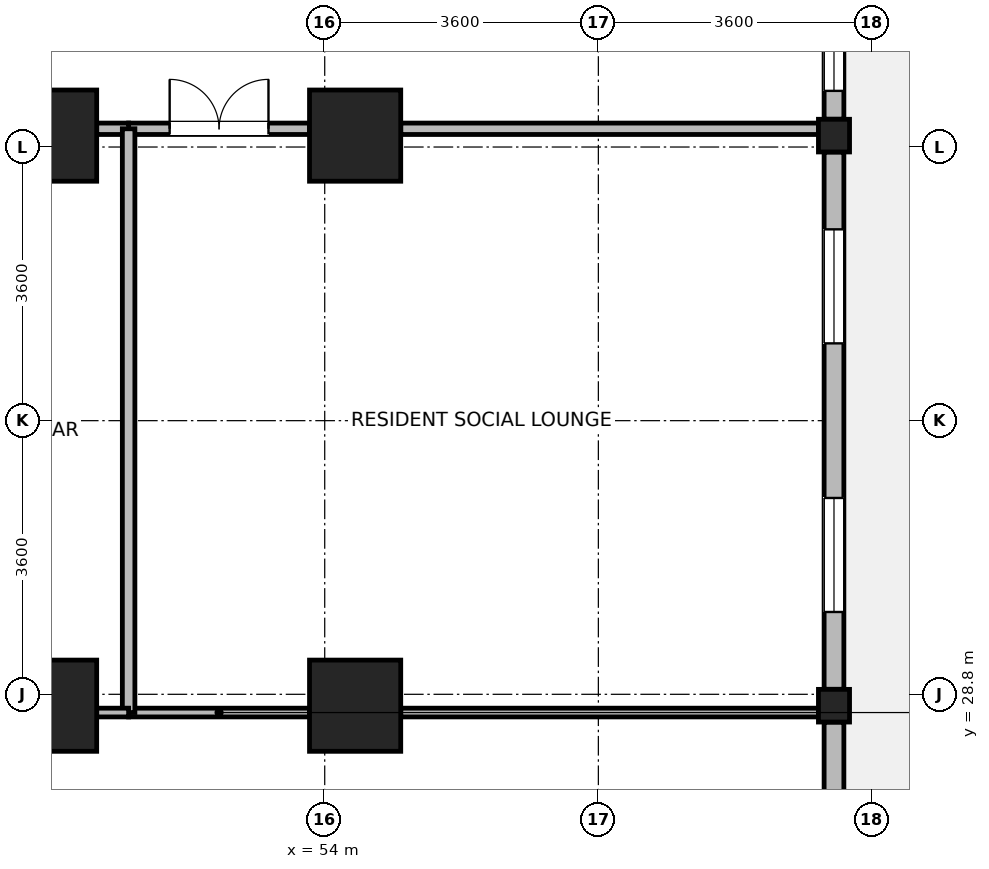
"""IFC4 building model, lengths in metres.
Left out: names, types, materials, properties, quantities, classifications, styles, units other than length and angle.
Written with IfcOpenShell. Run it as: python <this file> out.ifc"""

import sys

from ifc_helpers import new_model, si_unit, direction, frame, frame_2d, origin, origin_2d, place, context, subcontext, project, spatial, rectangle, i_section, extrude, source, transform, mapped, element, fill, save


model = new_model("IFC4")
c1 = context("Model", 3, precision=1e-05, world=origin(), true_north=direction((0.0, 1.0)))
c2 = subcontext(c1, "Body", "Model", "MODEL_VIEW")
j1 = project(units=[si_unit("LENGTHUNIT", "METRE"), si_unit("PLANEANGLEUNIT", "RADIAN")], contexts=[c1])
p1 = place(None, origin())
s1 = spatial("IfcSite", under=j1, at=p1, CompositionType="ELEMENT")
p2 = place(p1, origin())
s2 = spatial("IfcBuilding", under=s1, at=p2, CompositionType="ELEMENT")
p3 = place(p2, frame((0.0, 0.0, 111.9)))
s3 = spatial("IfcBuildingStorey", under=s2, at=p3, CompositionType="ELEMENT", Elevation=111.9)
m1 = source(origin(), c2, "Body", "SweptSolid", [
    extrude(rectangle(XDim=1.2, YDim=1.2, at=origin_2d()), origin(), (0.0, 0.0, 1.0), 3.7),
])
for number, where, z_axis, x_axis in (
    (1, (50.4, 28.65, 0.0), (0.0, 0.0, 1.0), (1.0, 0.0, 0.0)),
    (2, (50.4, 36.15, 0.0), (0.0, 0.0, 1.0), (1.0, 0.0, 0.0)),
    (3, (54.4, 28.65, 0.0), (0.0, 0.0, 1.0), (1.0, 0.0, 0.0)),
    (4, (54.4, 36.15, 0.0), (0.0, 0.0, 1.0), (1.0, 0.0, 0.0)),
):
    element("IfcColumn", number, at=place(p3, frame(where, z_axis=z_axis, x_axis=x_axis)), inside=s3, PredefinedType="COLUMN", context=c2, shape_type="MappedRepresentation", body=[
        mapped(m1, transform((0.0, 0.0, 0.0), x_axis=(1.0, 0.0, 0.0), y_axis=(0.0, 1.0, 0.0), z_axis=(0.0, 0.0, 1.0), scale=1.0)),
    ])
m2 = source(origin(), c2, "Body", "SweptSolid", [
    extrude(i_section(OverallWidth=0.409, OverallDepth=0.43, WebThickness=0.024, FlangeThickness=0.033, FilletRadius=0.015, at=origin_2d()), origin(), (0.0, 0.0, 1.0), 3.7),
])
for number, where, z_axis, x_axis in (
    (5, (60.7, 28.65, 0.0), (0.0, 0.0, 1.0), (1.0, 0.0, 0.0)),
    (6, (60.7, 36.15, 0.0), (0.0, 0.0, 1.0), (1.0, 0.0, 0.0)),
):
    element("IfcColumn", number, at=place(p3, frame(where, z_axis=z_axis, x_axis=x_axis)), inside=s3, PredefinedType="COLUMN", context=c2, shape_type="MappedRepresentation", body=[
        mapped(m2, transform((0.0, 0.0, 0.0), x_axis=(1.0, 0.0, 0.0), y_axis=(0.0, 1.0, 0.0), z_axis=(0.0, 0.0, 1.0), scale=1.0)),
    ])
p4 = place(p3, frame((60.7, 28.434, 0.0), z_axis=(0.0, 0.0, 1.0), x_axis=(0.0, -1.0, 0.0)))
e7 = element("IfcWall", 7, at=p4, inside=s3, PredefinedType="STANDARD", context=c2, shape_type="SweptSolid", body=[
    extrude(rectangle(XDim=6.618, YDim=0.26, at=frame_2d((3.309, 0.0))), origin(), (0.0, 0.0, 1.0), 2.98),
])
p5 = place(p4, frame((4.213, 0.0, 0.85)))
e8 = element("IfcOpeningElement", 8, at=p5, cuts=e7, PredefinedType="OPENING", context=c2, shape_type="SweptSolid", body=[
    extrude(rectangle(XDim=1.5, YDim=1.85, at=frame_2d((0.75, 0.925))), frame((0.0, 0.14, 0.0), z_axis=(0.0, -1.0, 0.0), x_axis=(1.0, 0.0, 0.0)), (0.0, 0.0, 1.0), 0.28),
])
p6 = place(p4, frame((2.834, 0.0, 0.85)))
e9 = element("IfcOpeningElement", 9, at=p6, cuts=e7, PredefinedType="OPENING", context=c2, shape_type="SweptSolid", body=[
    extrude(rectangle(XDim=0.95, YDim=1.75, at=frame_2d((0.475, 0.875))), frame((0.0, 0.14, 0.0), z_axis=(0.0, -1.0, 0.0), x_axis=(1.0, 0.0, 0.0)), (0.0, 0.0, 1.0), 0.28),
])
p7 = place(p3, frame((60.7, 35.934, 0.0), z_axis=(0.0, 0.0, 1.0), x_axis=(0.0, -1.0, 0.0)))
e10 = element("IfcWall", 10, at=p7, inside=s3, PredefinedType="STANDARD", context=c2, shape_type="SweptSolid", body=[
    extrude(rectangle(XDim=7.068, YDim=0.26, at=frame_2d((3.534, 0.0))), origin(), (0.0, 0.0, 1.0), 2.98),
])
p8 = place(p7, frame((1.017, 0.0, 0.85)))
e11 = element("IfcOpeningElement", 11, at=p8, cuts=e10, PredefinedType="OPENING", context=c2, shape_type="SweptSolid", body=[
    extrude(rectangle(XDim=1.5, YDim=1.85, at=frame_2d((0.75, 0.925))), frame((0.0, 0.14, 0.0), z_axis=(0.0, -1.0, 0.0), x_axis=(1.0, 0.0, 0.0)), (0.0, 0.0, 1.0), 0.28),
])
p9 = place(p7, frame((4.551, 0.0, 0.85)))
e12 = element("IfcOpeningElement", 12, at=p9, cuts=e10, PredefinedType="OPENING", context=c2, shape_type="SweptSolid", body=[
    extrude(rectangle(XDim=1.5, YDim=1.85, at=frame_2d((0.75, 0.925))), frame((0.0, 0.14, 0.0), z_axis=(0.0, -1.0, 0.0), x_axis=(1.0, 0.0, 0.0)), (0.0, 0.0, 1.0), 0.28),
])
p10 = place(p3, frame((60.7, 39.73, 0.0), z_axis=(0.0, 0.0, 1.0), x_axis=(0.0, -1.0, 0.0)))
e13 = element("IfcWall", 13, at=p10, inside=s3, PredefinedType="STANDARD", context=c2, shape_type="SweptSolid", body=[
    extrude(rectangle(XDim=3.364, YDim=0.26, at=frame_2d((1.682, 0.0))), origin(), (0.0, 0.0, 1.0), 3.43),
])
p11 = place(p10, frame((2.041, 0.0, 0.85)))
e14 = element("IfcOpeningElement", 14, at=p11, cuts=e13, PredefinedType="OPENING", context=c2, shape_type="SweptSolid", body=[
    extrude(rectangle(XDim=0.95, YDim=1.75, at=frame_2d((0.475, 0.875))), frame((0.0, 0.14, 0.0), z_axis=(0.0, -1.0, 0.0), x_axis=(1.0, 0.0, 0.0)), (0.0, 0.0, 1.0), 0.28),
])
p12 = place(p10, frame((0.265, 0.0, 0.85)))
e15 = element("IfcOpeningElement", 15, at=p12, cuts=e13, PredefinedType="OPENING", context=c2, shape_type="SweptSolid", body=[
    extrude(rectangle(XDim=0.95, YDim=1.75, at=frame_2d((0.475, 0.875))), frame((0.0, 0.14, 0.0), z_axis=(0.0, -1.0, 0.0), x_axis=(1.0, 0.0, 0.0)), (0.0, 0.0, 1.0), 0.28),
])
p13 = place(p3, frame((51.42, 36.24, 0.0), z_axis=(0.0, 0.0, 1.0), x_axis=(1.0, 0.0, 0.0)))
e16 = element("IfcWall", 16, at=p13, inside=s3, PredefinedType="PARTITIONING", context=c2, shape_type="SweptSolid", body=[
    extrude(rectangle(XDim=2.38, YDim=0.15, at=frame_2d((1.19, 0.0))), origin(), (0.0, 0.0, 1.0), 2.78),
])
p14 = place(p13, frame((0.54, 0.0, 0.0)))
e17 = element("IfcOpeningElement", 17, at=p14, cuts=e16, PredefinedType="OPENING", context=c2, shape_type="SweptSolid", body=[
    extrude(rectangle(XDim=1.3, YDim=2.12, at=frame_2d((0.65, 1.06))), frame((0.0, 0.085, 0.0), z_axis=(0.0, -1.0, 0.0), x_axis=(1.0, 0.0, 0.0)), (0.0, 0.0, 1.0), 0.17),
])
p15 = place(p3, frame((55.0, 36.24, 0.0), z_axis=(0.0, 0.0, 1.0), x_axis=(1.0, 0.0, 0.0)))
e18 = element("IfcWall", 18, at=p15, inside=s3, PredefinedType="PARTITIONING", context=c2, shape_type="SweptSolid", body=[
    extrude(rectangle(XDim=5.496, YDim=0.15, at=frame_2d((2.748, 0.0))), origin(), (0.0, 0.0, 1.0), 2.78),
])
p16 = place(p3, frame((51.0, 36.24, 0.0), z_axis=(0.0, 0.0, 1.0), x_axis=(1.0, 0.0, 0.0)))
e19 = element("IfcWall", 19, at=p16, inside=s3, PredefinedType="PARTITIONING", context=c2, shape_type="SweptSolid", body=[
    extrude(rectangle(XDim=0.42, YDim=0.15, at=frame_2d((0.21, 0.0))), origin(), (0.0, 0.0, 1.0), 2.78),
])
p17 = place(p3, frame((51.42, 28.56, 0.0), z_axis=(0.0, 0.0, 1.0), x_axis=(1.0, 0.0, 0.0)))
e20 = element("IfcWall", 20, at=p17, inside=s3, PredefinedType="PARTITIONING", context=c2, shape_type="SweptSolid", body=[
    extrude(rectangle(XDim=2.38, YDim=0.115, at=frame_2d((1.19, 0.0))), origin(), (0.0, 0.0, 1.0), 2.78),
])
p18 = place(p3, frame((55.0, 28.56, 0.0), z_axis=(0.0, 0.0, 1.0), x_axis=(1.0, 0.0, 0.0)))
e21 = element("IfcWall", 21, at=p18, inside=s3, PredefinedType="PARTITIONING", context=c2, shape_type="SweptSolid", body=[
    extrude(rectangle(XDim=5.496, YDim=0.115, at=frame_2d((2.748, 0.0))), origin(), (0.0, 0.0, 1.0), 2.78),
])
p19 = place(p3, frame((51.42, 28.56, 0.0), z_axis=(0.0, 0.0, 1.0), x_axis=(0.0, 1.0, 0.0)))
e22 = element("IfcWall", 22, at=p19, inside=s3, PredefinedType="PARTITIONING", context=c2, shape_type="SweptSolid", body=[
    extrude(rectangle(XDim=7.68, YDim=0.165, at=frame_2d((3.84, 0.0))), origin(), (0.0, 0.0, 1.0), 3.43),
])
p20 = place(p3, frame((51.0, 28.56, 0.0), z_axis=(0.0, 0.0, 1.0), x_axis=(1.0, 0.0, 0.0)))
e23 = element("IfcWall", 23, at=p20, inside=s3, PredefinedType="PARTITIONING", context=c2, shape_type="SweptSolid", body=[
    extrude(rectangle(XDim=0.42, YDim=0.115, at=frame_2d((0.21, 0.0))), origin(), (0.0, 0.0, 1.0), 2.78),
])
p21 = place(p8, origin())
e24 = element("IfcWindow", 24, at=p21, inside=s3, PartitioningType="SINGLE_PANEL", PredefinedType="WINDOW", context=c2, shape_type="SweptSolid", body=[
    extrude(rectangle(XDim=1.5, YDim=1.85, at=frame_2d((0.75, 0.925))), frame((0.0, 0.03, 0.0), z_axis=(0.0, -1.0, 0.0), x_axis=(1.0, 0.0, 0.0)), (0.0, 0.0, 1.0), 0.06),
])
fill(e11, e24)
p22 = place(p9, origin())
e25 = element("IfcWindow", 25, at=p22, inside=s3, PartitioningType="SINGLE_PANEL", PredefinedType="WINDOW", context=c2, shape_type="SweptSolid", body=[
    extrude(rectangle(XDim=1.5, YDim=1.85, at=frame_2d((0.75, 0.925))), frame((0.0, 0.03, 0.0), z_axis=(0.0, -1.0, 0.0), x_axis=(1.0, 0.0, 0.0)), (0.0, 0.0, 1.0), 0.06),
])
fill(e12, e25)
p23 = place(p11, origin())
e26 = element("IfcWindow", 26, at=p23, inside=s3, PartitioningType="SINGLE_PANEL", PredefinedType="WINDOW", context=c2, shape_type="SweptSolid", body=[
    extrude(rectangle(XDim=0.95, YDim=1.75, at=frame_2d((0.475, 0.875))), frame((0.0, 0.03, 0.0), z_axis=(0.0, -1.0, 0.0), x_axis=(1.0, 0.0, 0.0)), (0.0, 0.0, 1.0), 0.06),
])
fill(e14, e26)
p24 = place(p14, origin())
e27 = element("IfcDoor", 27, at=p24, inside=s3, OperationType="DOUBLE_DOOR_SINGLE_SWING", PredefinedType="DOOR", context=c2, shape_type="SweptSolid", body=[
    extrude(rectangle(XDim=1.3, YDim=2.12, at=frame_2d((0.65, 1.06))), frame((0.0, 0.025, 0.0), z_axis=(0.0, -1.0, 0.0), x_axis=(1.0, 0.0, 0.0)), (0.0, 0.0, 1.0), 0.05),
])
fill(e17, e27)
save(model, sys.argv[1])
